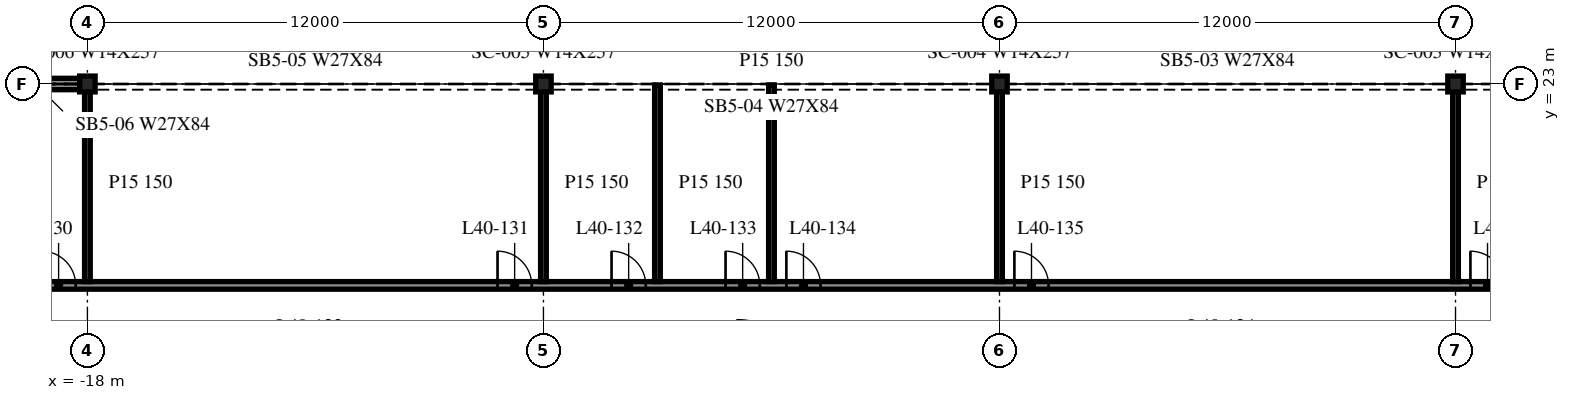
"""IFC4 building model, lengths in metres.
Left out: names, types, materials, properties, quantities, classifications, styles, units other than length and angle.
Written with IfcOpenShell. Run it as: python <this file> out.ifc"""

import sys

from ifc_helpers import new_model, si_unit, direction, frame, frame_2d, origin, origin_2d, place, context, subcontext, project, spatial, rectangle, i_section, extrude, element, fill, save


model = new_model("IFC4")
c1 = context("Model", 3, precision=1e-05, world=origin(), true_north=direction((0.0, 1.0)))
c2 = subcontext(c1, "Body", "Model", "MODEL_VIEW")
j1 = project(units=[si_unit("LENGTHUNIT", "METRE"), si_unit("PLANEANGLEUNIT", "RADIAN")], contexts=[c1])
p1 = place(None, origin())
s1 = spatial("IfcSite", under=j1, at=p1, CompositionType="ELEMENT")
p2 = place(p1, origin())
s2 = spatial("IfcBuilding", under=s1, at=p2, CompositionType="ELEMENT")
p3 = place(p2, frame((0.0, 0.0, 170.6)))
s3 = spatial("IfcBuildingStorey", under=s2, at=p3, CompositionType="ELEMENT", Elevation=170.6)
for number, where, z_axis, x_axis in (
    (1, (18.0, 23.0, -0.34), (0.0, 0.0, 1.0), (1.0, 0.0, 0.0)),
    (2, (6.0, 23.0, -0.34), (0.0, 0.0, 1.0), (1.0, 0.0, 0.0)),
    (3, (-6.0, 23.0, -0.34), (0.0, 0.0, 1.0), (1.0, 0.0, 0.0)),
    (4, (-18.0, 23.0, -0.34), (0.0, 0.0, 1.0), (1.0, 0.0, 0.0)),
):
    element("IfcColumn", number, at=place(p3, frame(where, z_axis=z_axis, x_axis=x_axis)), inside=s3, PredefinedType="COLUMN", context=c2, shape_type="SweptSolid", body=[
        extrude(i_section(OverallWidth=0.406, OverallDepth=0.417, WebThickness=0.03, FlangeThickness=0.048, at=origin_2d()), origin(), (0.0, 0.0, 1.0), 3.8),
    ])
p4 = place(p3, frame((-18.015, 23.0, 0.0), z_axis=(0.0, 0.0, 1.0), x_axis=(-1.0, 0.0, 0.0)))
e5 = element("IfcWall", 5, at=p4, inside=s3, PredefinedType="NOTDEFINED", context=c2, shape_type="SweptSolid", body=[
    extrude(rectangle(XDim=11.97, YDim=0.3, at=frame_2d((5.985, 0.0))), origin(), (0.0, 0.0, 1.0), 2.782),
])
p5 = place(p3, frame((-47.708, 17.7, 0.0), z_axis=(0.0, 0.0, 1.0), x_axis=(1.0, 0.0, 0.0)))
e6 = element("IfcWall", 6, at=p5, inside=s3, PredefinedType="PARTITIONING", context=c2, shape_type="SweptSolid", body=[
    extrude(rectangle(XDim=95.416, YDim=0.2, at=frame_2d((47.708, 0.0))), origin(), (0.0, 0.0, 1.0), 3.46),
])
p6 = place(p5, frame((4.5, 0.0, 0.0)))
e7 = element("IfcOpeningElement", 7, at=p6, cuts=e6, PredefinedType="OPENING", context=c2, shape_type="SweptSolid", body=[
    extrude(rectangle(XDim=0.9, YDim=2.1, at=frame_2d((0.45, 1.05))), frame((0.0, 0.11, 0.0), z_axis=(0.0, -1.0, 0.0), x_axis=(1.0, 0.0, 0.0)), (0.0, 0.0, 1.0), 0.22),
])
p7 = place(p5, frame((16.5, 0.0, 0.0)))
e8 = element("IfcOpeningElement", 8, at=p7, cuts=e6, PredefinedType="OPENING", context=c2, shape_type="SweptSolid", body=[
    extrude(rectangle(XDim=0.9, YDim=2.1, at=frame_2d((0.45, 1.05))), frame((0.0, 0.11, 0.0), z_axis=(0.0, -1.0, 0.0), x_axis=(1.0, 0.0, 0.0)), (0.0, 0.0, 1.0), 0.22),
])
p8 = place(p5, frame((19.5, 0.0, 0.0)))
e9 = element("IfcOpeningElement", 9, at=p8, cuts=e6, PredefinedType="OPENING", context=c2, shape_type="SweptSolid", body=[
    extrude(rectangle(XDim=0.9, YDim=2.1, at=frame_2d((0.45, 1.05))), frame((0.0, 0.11, 0.0), z_axis=(0.0, -1.0, 0.0), x_axis=(1.0, 0.0, 0.0)), (0.0, 0.0, 1.0), 0.22),
])
p9 = place(p5, frame((22.5, 0.0, 0.0)))
e10 = element("IfcOpeningElement", 10, at=p9, cuts=e6, PredefinedType="OPENING", context=c2, shape_type="SweptSolid", body=[
    extrude(rectangle(XDim=0.9, YDim=2.1, at=frame_2d((0.45, 1.05))), frame((0.0, 0.11, 0.0), z_axis=(0.0, -1.0, 0.0), x_axis=(1.0, 0.0, 0.0)), (0.0, 0.0, 1.0), 0.22),
])
p10 = place(p5, frame((28.5, 0.0, 0.0)))
e11 = element("IfcOpeningElement", 11, at=p10, cuts=e6, PredefinedType="OPENING", context=c2, shape_type="SweptSolid", body=[
    extrude(rectangle(XDim=0.9, YDim=2.1, at=frame_2d((0.45, 1.05))), frame((0.0, 0.11, 0.0), z_axis=(0.0, -1.0, 0.0), x_axis=(1.0, 0.0, 0.0)), (0.0, 0.0, 1.0), 0.22),
])
p11 = place(p5, frame((40.5, 0.0, 0.0)))
e12 = element("IfcOpeningElement", 12, at=p11, cuts=e6, PredefinedType="OPENING", context=c2, shape_type="SweptSolid", body=[
    extrude(rectangle(XDim=0.9, YDim=2.1, at=frame_2d((0.45, 1.05))), frame((0.0, 0.11, 0.0), z_axis=(0.0, -1.0, 0.0), x_axis=(1.0, 0.0, 0.0)), (0.0, 0.0, 1.0), 0.22),
])
p12 = place(p5, frame((43.5, 0.0, 0.0)))
e13 = element("IfcOpeningElement", 13, at=p12, cuts=e6, PredefinedType="OPENING", context=c2, shape_type="SweptSolid", body=[
    extrude(rectangle(XDim=0.9, YDim=2.1, at=frame_2d((0.45, 1.05))), frame((0.0, 0.11, 0.0), z_axis=(0.0, -1.0, 0.0), x_axis=(1.0, 0.0, 0.0)), (0.0, 0.0, 1.0), 0.22),
])
p13 = place(p5, frame((46.5, 0.0, 0.0)))
e14 = element("IfcOpeningElement", 14, at=p13, cuts=e6, PredefinedType="OPENING", context=c2, shape_type="SweptSolid", body=[
    extrude(rectangle(XDim=0.9, YDim=2.1, at=frame_2d((0.45, 1.05))), frame((0.0, 0.11, 0.0), z_axis=(0.0, -1.0, 0.0), x_axis=(1.0, 0.0, 0.0)), (0.0, 0.0, 1.0), 0.22),
])
p14 = place(p5, frame((48.1, 0.0, 0.0)))
e15 = element("IfcOpeningElement", 15, at=p14, cuts=e6, PredefinedType="OPENING", context=c2, shape_type="SweptSolid", body=[
    extrude(rectangle(XDim=0.9, YDim=2.1, at=frame_2d((0.45, 1.05))), frame((0.0, 0.11, 0.0), z_axis=(0.0, -1.0, 0.0), x_axis=(1.0, 0.0, 0.0)), (0.0, 0.0, 1.0), 0.22),
])
p15 = place(p5, frame((54.1, 0.0, 0.0)))
e16 = element("IfcOpeningElement", 16, at=p15, cuts=e6, PredefinedType="OPENING", context=c2, shape_type="SweptSolid", body=[
    extrude(rectangle(XDim=0.9, YDim=2.1, at=frame_2d((0.45, 1.05))), frame((0.0, 0.11, 0.0), z_axis=(0.0, -1.0, 0.0), x_axis=(1.0, 0.0, 0.0)), (0.0, 0.0, 1.0), 0.22),
])
p16 = place(p5, frame((66.1, 0.0, 0.0)))
e17 = element("IfcOpeningElement", 17, at=p16, cuts=e6, PredefinedType="OPENING", context=c2, shape_type="SweptSolid", body=[
    extrude(rectangle(XDim=0.9, YDim=2.1, at=frame_2d((0.45, 1.05))), frame((0.0, 0.11, 0.0), z_axis=(0.0, -1.0, 0.0), x_axis=(1.0, 0.0, 0.0)), (0.0, 0.0, 1.0), 0.22),
])
p17 = place(p5, frame((69.1, 0.0, 0.0)))
e18 = element("IfcOpeningElement", 18, at=p17, cuts=e6, PredefinedType="OPENING", context=c2, shape_type="SweptSolid", body=[
    extrude(rectangle(XDim=0.9, YDim=2.1, at=frame_2d((0.45, 1.05))), frame((0.0, 0.11, 0.0), z_axis=(0.0, -1.0, 0.0), x_axis=(1.0, 0.0, 0.0)), (0.0, 0.0, 1.0), 0.22),
])
p18 = place(p5, frame((72.1, 0.0, 0.0)))
e19 = element("IfcOpeningElement", 19, at=p18, cuts=e6, PredefinedType="OPENING", context=c2, shape_type="SweptSolid", body=[
    extrude(rectangle(XDim=0.9, YDim=2.1, at=frame_2d((0.45, 1.05))), frame((0.0, 0.11, 0.0), z_axis=(0.0, -1.0, 0.0), x_axis=(1.0, 0.0, 0.0)), (0.0, 0.0, 1.0), 0.22),
])
p19 = place(p5, frame((78.1, 0.0, 0.0)))
e20 = element("IfcOpeningElement", 20, at=p19, cuts=e6, PredefinedType="OPENING", context=c2, shape_type="SweptSolid", body=[
    extrude(rectangle(XDim=0.9, YDim=2.1, at=frame_2d((0.45, 1.05))), frame((0.0, 0.11, 0.0), z_axis=(0.0, -1.0, 0.0), x_axis=(1.0, 0.0, 0.0)), (0.0, 0.0, 1.0), 0.22),
])
p20 = place(p5, frame((90.1, 0.0, 0.0)))
e21 = element("IfcOpeningElement", 21, at=p20, cuts=e6, PredefinedType="OPENING", context=c2, shape_type="SweptSolid", body=[
    extrude(rectangle(XDim=0.9, YDim=2.1, at=frame_2d((0.45, 1.05))), frame((0.0, 0.11, 0.0), z_axis=(0.0, -1.0, 0.0), x_axis=(1.0, 0.0, 0.0)), (0.0, 0.0, 1.0), 0.22),
])
for number, where, z_axis, x_axis in (
    (22, (-18.0, 17.8, 0.0), (0.0, 0.0, 1.0), (0.0, 1.0, 0.0)),
    (23, (-6.0, 17.8, 0.0), (0.0, 0.0, 1.0), (0.0, 1.0, 0.0)),
    (24, (-3.0, 17.8, 0.0), (0.0, 0.0, 1.0), (0.0, 1.0, 0.0)),
    (25, (0.0, 17.8, 0.0), (0.0, 0.0, 1.0), (0.0, 1.0, 0.0)),
    (26, (6.0, 17.8, 0.0), (0.0, 0.0, 1.0), (0.0, 1.0, 0.0)),
    (27, (18.0, 17.8, 0.0), (0.0, 0.0, 1.0), (0.0, 1.0, 0.0)),
):
    element("IfcWall", number, at=place(p3, frame(where, z_axis=z_axis, x_axis=x_axis)), inside=s3, PredefinedType="PARTITIONING", context=c2, shape_type="SweptSolid", body=[
        extrude(rectangle(XDim=5.175, YDim=0.15, at=frame_2d((2.587, 0.0))), origin(), (0.0, 0.0, 1.0), 3.46),
    ])
p21 = place(p10, origin())
e28 = element("IfcDoor", 28, at=p21, inside=s3, OperationType="SINGLE_SWING_LEFT", PredefinedType="DOOR", context=c2, shape_type="SweptSolid", body=[
    extrude(rectangle(XDim=0.9, YDim=2.1, at=frame_2d((0.45, 1.05))), frame((0.0, 0.025, 0.0), z_axis=(0.0, -1.0, 0.0), x_axis=(1.0, 0.0, 0.0)), (0.0, 0.0, 1.0), 0.05),
])
fill(e11, e28)
p22 = place(p11, origin())
e29 = element("IfcDoor", 29, at=p22, inside=s3, OperationType="SINGLE_SWING_LEFT", PredefinedType="DOOR", context=c2, shape_type="SweptSolid", body=[
    extrude(rectangle(XDim=0.9, YDim=2.1, at=frame_2d((0.45, 1.05))), frame((0.0, 0.025, 0.0), z_axis=(0.0, -1.0, 0.0), x_axis=(1.0, 0.0, 0.0)), (0.0, 0.0, 1.0), 0.05),
])
fill(e12, e29)
p23 = place(p12, origin())
e30 = element("IfcDoor", 30, at=p23, inside=s3, OperationType="SINGLE_SWING_LEFT", PredefinedType="DOOR", context=c2, shape_type="SweptSolid", body=[
    extrude(rectangle(XDim=0.9, YDim=2.1, at=frame_2d((0.45, 1.05))), frame((0.0, 0.025, 0.0), z_axis=(0.0, -1.0, 0.0), x_axis=(1.0, 0.0, 0.0)), (0.0, 0.0, 1.0), 0.05),
])
fill(e13, e30)
p24 = place(p13, origin())
e31 = element("IfcDoor", 31, at=p24, inside=s3, OperationType="SINGLE_SWING_LEFT", PredefinedType="DOOR", context=c2, shape_type="SweptSolid", body=[
    extrude(rectangle(XDim=0.9, YDim=2.1, at=frame_2d((0.45, 1.05))), frame((0.0, 0.025, 0.0), z_axis=(0.0, -1.0, 0.0), x_axis=(1.0, 0.0, 0.0)), (0.0, 0.0, 1.0), 0.05),
])
fill(e14, e31)
p25 = place(p14, origin())
e32 = element("IfcDoor", 32, at=p25, inside=s3, OperationType="SINGLE_SWING_RIGHT", PredefinedType="DOOR", context=c2, shape_type="SweptSolid", body=[
    extrude(rectangle(XDim=0.9, YDim=2.1, at=frame_2d((0.45, 1.05))), frame((0.0, 0.025, 0.0), z_axis=(0.0, -1.0, 0.0), x_axis=(1.0, 0.0, 0.0)), (0.0, 0.0, 1.0), 0.05),
])
fill(e15, e32)
p26 = place(p15, origin())
e33 = element("IfcDoor", 33, at=p26, inside=s3, OperationType="SINGLE_SWING_RIGHT", PredefinedType="DOOR", context=c2, shape_type="SweptSolid", body=[
    extrude(rectangle(XDim=0.9, YDim=2.1, at=frame_2d((0.45, 1.05))), frame((0.0, 0.025, 0.0), z_axis=(0.0, -1.0, 0.0), x_axis=(1.0, 0.0, 0.0)), (0.0, 0.0, 1.0), 0.05),
])
fill(e16, e33)
p27 = place(p16, origin())
e34 = element("IfcDoor", 34, at=p27, inside=s3, OperationType="SINGLE_SWING_RIGHT", PredefinedType="DOOR", context=c2, shape_type="SweptSolid", body=[
    extrude(rectangle(XDim=0.9, YDim=2.1, at=frame_2d((0.45, 1.05))), frame((0.0, 0.025, 0.0), z_axis=(0.0, -1.0, 0.0), x_axis=(1.0, 0.0, 0.0)), (0.0, 0.0, 1.0), 0.05),
])
fill(e17, e34)
save(model, sys.argv[1])
